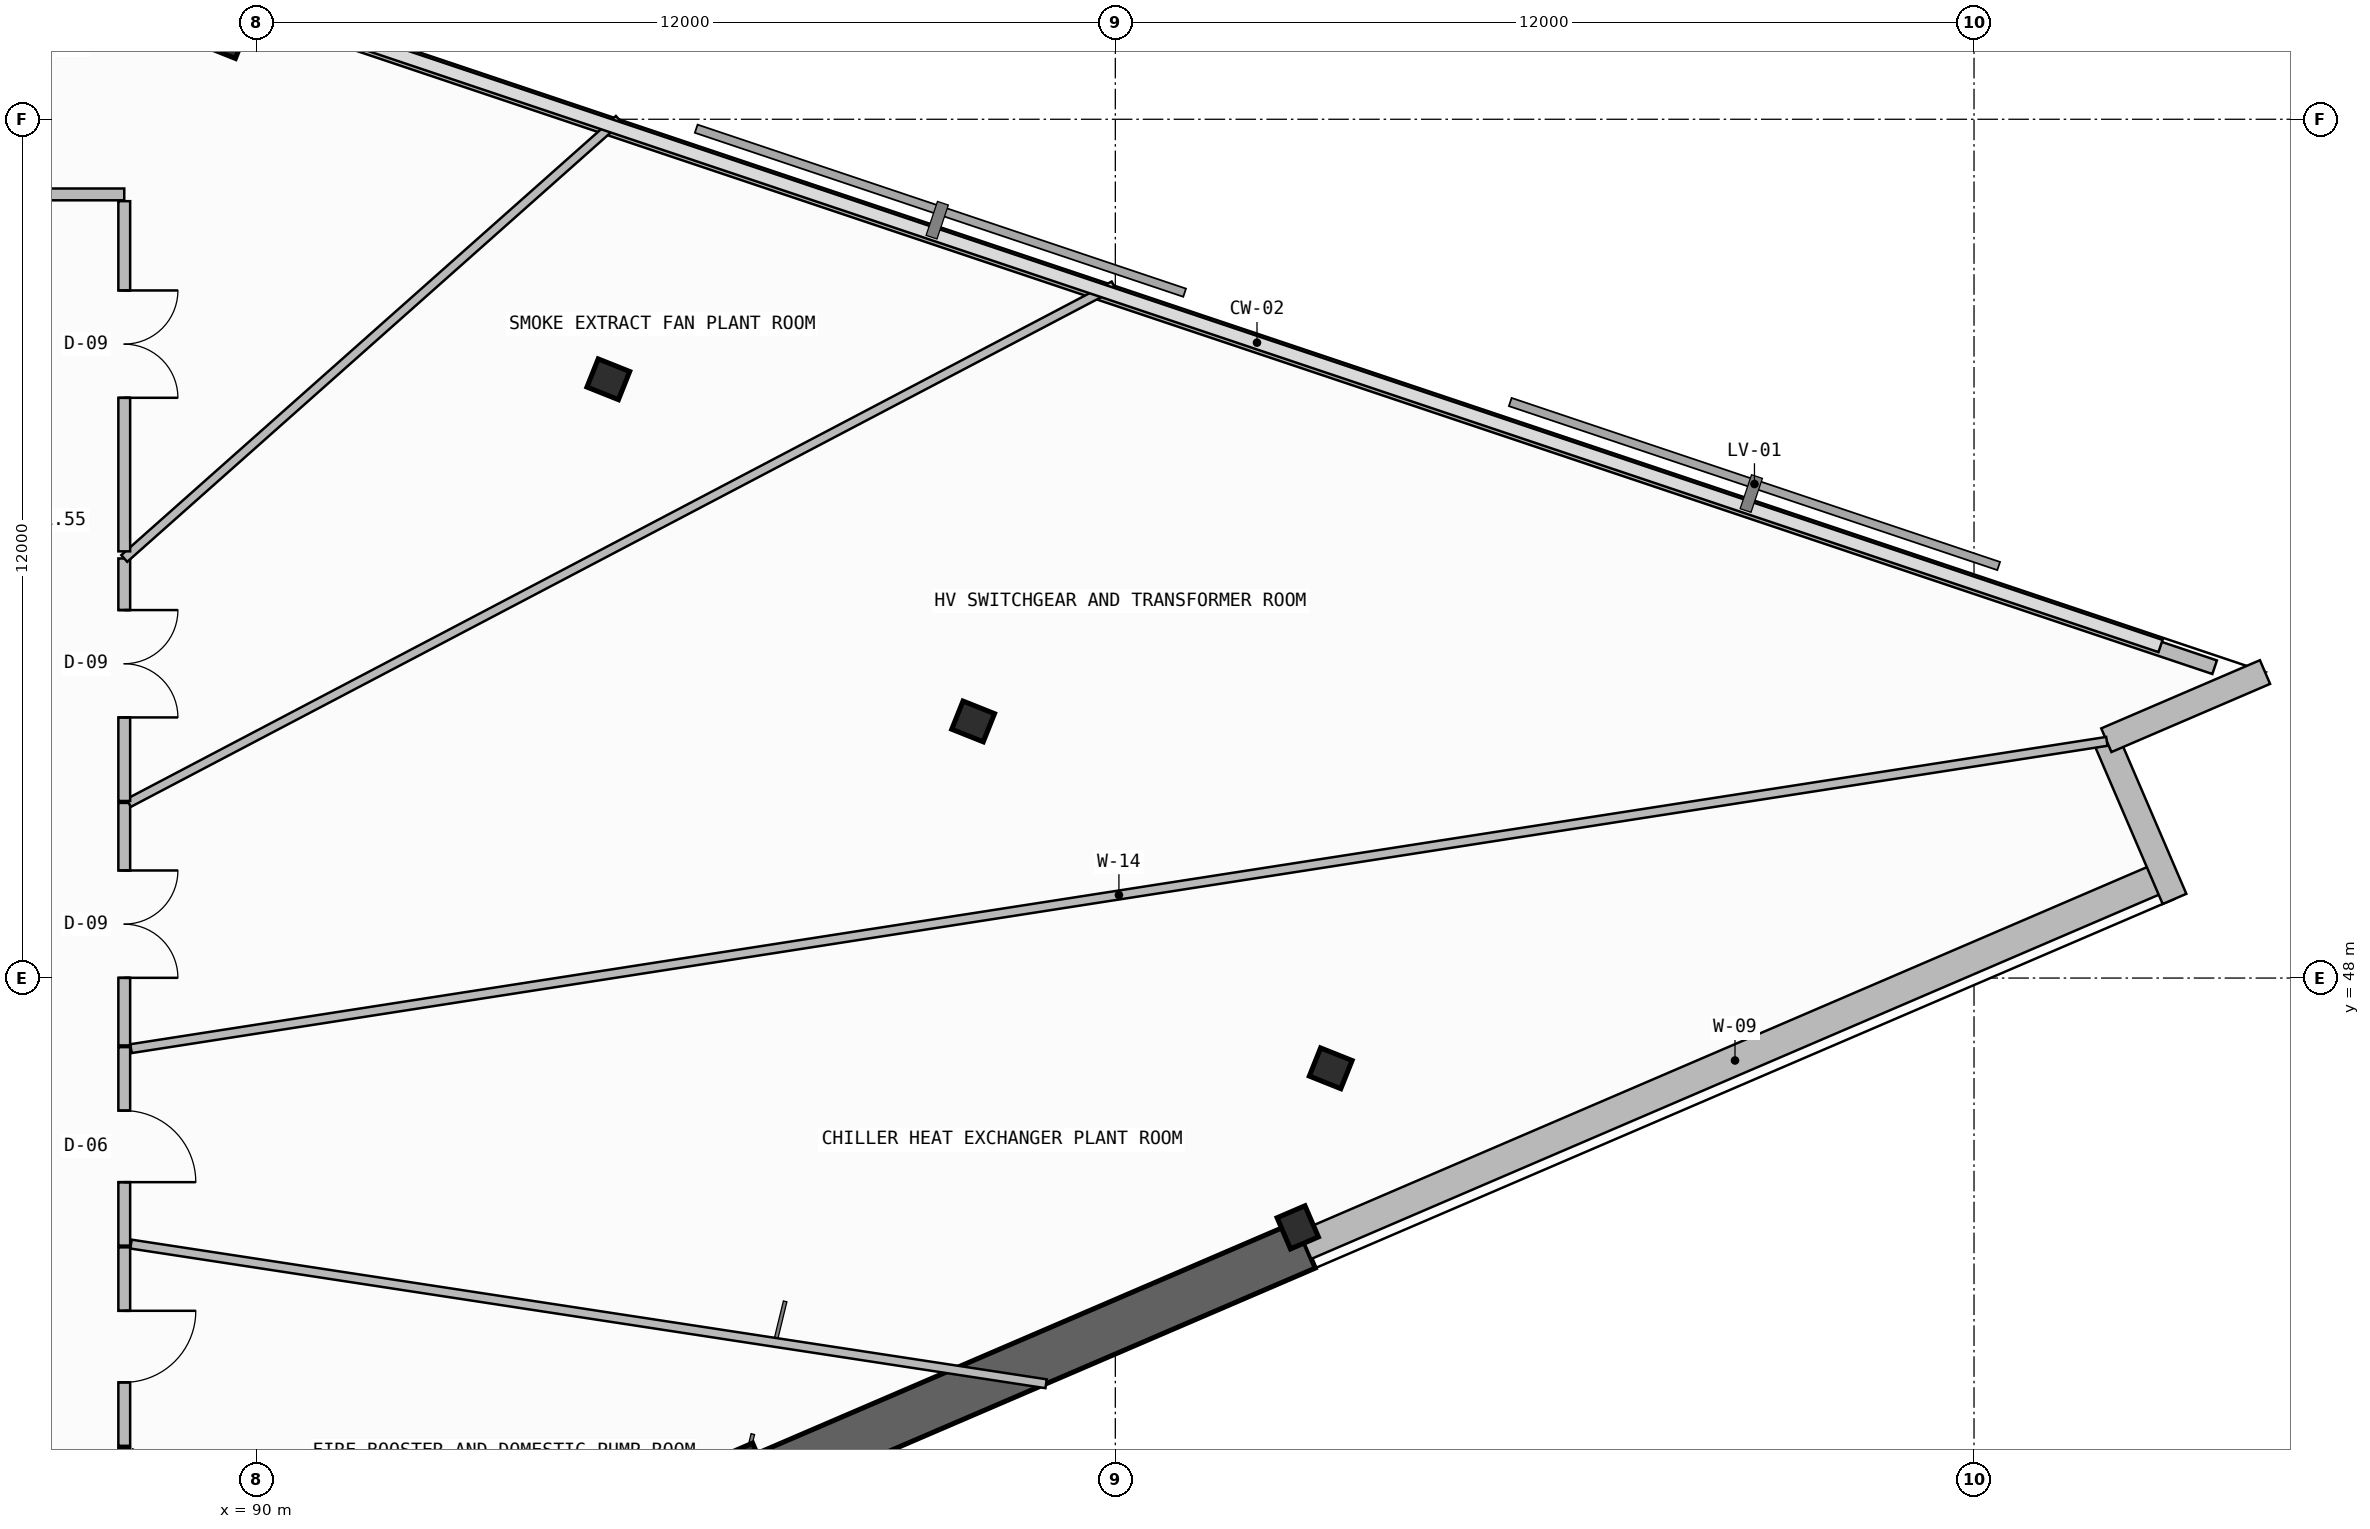
"""IFC4 building model, lengths in metres.
Left out: names, types, materials, properties, quantities, classifications, styles, units other than length and angle.
Written with IfcOpenShell. Run it as: python <this file> out.ifc"""

import sys

from ifc_helpers import new_model, si_unit, direction, frame, frame_2d, origin, origin_2d, place, context, subcontext, project, spatial, rectangle, i_section, extrude, element, fill, save


model = new_model("IFC4")
c1 = context("Model", 3, precision=1e-05, world=origin(), true_north=direction((0.0, 1.0)))
c2 = subcontext(c1, "Body", "Model", "MODEL_VIEW")
j1 = project(units=[si_unit("LENGTHUNIT", "METRE"), si_unit("PLANEANGLEUNIT", "RADIAN")], contexts=[c1])
p1 = place(None, origin())
s1 = spatial("IfcSite", under=j1, at=p1, CompositionType="ELEMENT")
p2 = place(p1, origin())
s2 = spatial("IfcBuilding", under=s1, at=p2, CompositionType="ELEMENT")
p3 = place(p2, frame((0.0, 0.0, 196.7)))
s3 = spatial("IfcBuildingStorey", under=s2, at=p3, CompositionType="ELEMENT", Elevation=196.7)
for number, where, z_axis, x_axis in (
    (1, (96.83, 41.2, 0.0), (0.0, 0.0, 1.0), (0.919, 0.395, 0.0)),
    (2, (104.549, 44.517, 0.0), (0.0, 0.0, 1.0), (0.919, 0.395, 0.0)),
    (3, (105.01, 46.739, 0.0), (0.0, 0.0, 1.0), (0.371, 0.929, 0.0)),
    (4, (100.013, 51.585, 0.0), (0.0, 0.0, 1.0), (0.371, 0.929, 0.0)),
    (5, (94.915, 56.367, 0.0), (0.0, 0.0, 1.0), (0.371, 0.929, 0.0)),
    (6, (89.562, 61.135, 0.0), (0.0, 0.0, 1.0), (0.371, 0.929, 0.0)),
):
    element("IfcColumn", number, at=place(p3, frame(where, z_axis=z_axis, x_axis=x_axis)), inside=s3, PredefinedType="COLUMN", context=c2, shape_type="SweptSolid", body=[
        extrude(i_section(OverallWidth=0.424, OverallDepth=0.474, WebThickness=0.048, FlangeThickness=0.077, FilletRadius=0.015, at=origin_2d()), origin(), (0.0, 0.0, 1.0), 4.2),
    ])
p4 = place(p3, frame((96.937, 40.952, -0.5), z_axis=(0.0, 0.0, 1.0), x_axis=(0.918782407933, 0.394764343468, 0.0)))
e7 = element("IfcWall", 7, at=p4, inside=s3, PredefinedType="SHEAR", context=c2, shape_type="SweptSolid", body=[
    extrude(rectangle(XDim=8.402, YDim=0.7, at=frame_2d((4.201, 0.0))), origin(), (0.0, 0.0, 1.0), 4.3),
])
p5 = place(p3, frame((104.656, 44.269, 0.0), z_axis=(0.0, 0.0, 1.0), x_axis=(0.918789071809, 0.394748833467, 0.0)))
e8 = element("IfcWall", 8, at=p5, inside=s3, PredefinedType="SOLIDWALL", context=c2, shape_type="SweptSolid", body=[
    extrude(rectangle(XDim=13.069, YDim=0.42, at=frame_2d((6.534, 0.0))), origin(), (0.0, 0.0, 1.0), 2.777),
])
p6 = place(p3, frame((116.802, 49.106, 0.0), z_axis=(0.0, 0.0, 1.0), x_axis=(-0.394712707157, 0.918804592288, 0.0)))
e9 = element("IfcWall", 9, at=p6, inside=s3, PredefinedType="SOLIDWALL", context=c2, shape_type="SweptSolid", body=[
    extrude(rectangle(XDim=2.414, YDim=0.36, at=frame_2d((1.207, 0.0))), origin(), (0.0, 0.0, 1.0), 3.8),
])
p7 = place(p3, frame((115.849, 51.323, 0.0), z_axis=(0.0, 0.0, 1.0), x_axis=(0.918788830096, 0.394749396062, 0.0)))
e10 = element("IfcWall", 10, at=p7, inside=s3, PredefinedType="SOLIDWALL", context=c2, shape_type="SweptSolid", body=[
    extrude(rectangle(XDim=2.413, YDim=0.36, at=frame_2d((1.207, 0.0))), origin(), (0.0, 0.0, 1.0), 3.8),
])
p8 = place(p3, frame((117.363, 52.344, 0.0), z_axis=(0.0, 0.0, 1.0), x_axis=(-0.94800468727, 0.31825636351, 0.0)))
e11 = element("IfcWall", 11, at=p8, inside=s3, PredefinedType="PARAPET", context=c2, shape_type="SweptSolid", body=[
    extrude(rectangle(XDim=31.869, YDim=0.2, at=frame_2d((15.935, 0.0))), origin(), (0.0, 0.0, 1.0), 1.15),
])
p9 = place(p3, frame((88.15, 38.592, 0.0), z_axis=(0.0, 0.0, 1.0), x_axis=(0.0, 1.0, 0.0)))
e12 = element("IfcWall", 12, at=p9, inside=s3, PredefinedType="PARTITIONING", context=c2, shape_type="SweptSolid", body=[
    extrude(rectangle(XDim=2.845, YDim=0.165, at=frame_2d((1.423, 0.0))), origin(), (0.0, 0.0, 1.0), 2.777),
])
p10 = place(p9, frame((0.706, 0.0, 0.0)))
e13 = element("IfcOpeningElement", 13, at=p10, cuts=e12, PredefinedType="OPENING", context=c2, shape_type="SweptSolid", body=[
    extrude(rectangle(XDim=1.0, YDim=2.2, at=frame_2d((0.5, 1.1))), frame((0.0, 0.093, 0.0), z_axis=(0.0, -1.0, 0.0), x_axis=(1.0, 0.0, 0.0)), (0.0, 0.0, 1.0), 0.185),
])
p11 = place(p3, frame((88.244, 41.355, 0.0), z_axis=(0.0, 0.0, 1.0), x_axis=(0.910133851889, -0.414314339175, 0.0)))
e14 = element("IfcWall", 14, at=p11, inside=s3, PredefinedType="PARTITIONING", context=c2, shape_type="SweptSolid", body=[
    extrude(rectangle(XDim=5.61, YDim=0.125, at=frame_2d((2.805, 0.0))), origin(), (0.0, 0.0, 1.0), 2.777),
])
p12 = place(p3, frame((88.15, 44.261, 0.0), z_axis=(0.0, 0.0, 1.0), x_axis=(0.0, 1.0, 0.0)))
e15 = element("IfcWall", 15, at=p12, inside=s3, PredefinedType="PARTITIONING", context=c2, shape_type="SweptSolid", body=[
    extrude(rectangle(XDim=2.773, YDim=0.165, at=frame_2d((1.387, 0.0))), origin(), (0.0, 0.0, 1.0), 3.8),
])
p13 = place(p12, frame((0.887, 0.0, 0.0)))
e16 = element("IfcOpeningElement", 16, at=p13, cuts=e15, PredefinedType="OPENING", context=c2, shape_type="SweptSolid", body=[
    extrude(rectangle(XDim=1.0, YDim=2.2, at=frame_2d((0.5, 1.1))), frame((0.0, 0.093, 0.0), z_axis=(0.0, -1.0, 0.0), x_axis=(1.0, 0.0, 0.0)), (0.0, 0.0, 1.0), 0.185),
])
p14 = place(p3, frame((101.033, 42.331, 0.0), z_axis=(0.0, 0.0, 1.0), x_axis=(-0.988557493013, 0.150844565722, 0.0)))
e17 = element("IfcWall", 17, at=p14, inside=s3, PredefinedType="PARTITIONING", context=c2, shape_type="SweptSolid", body=[
    extrude(rectangle(XDim=12.937, YDim=0.125, at=frame_2d((6.468, 0.0))), origin(), (0.0, 0.0, 1.0), 2.777),
])
p15 = place(p3, frame((88.244, 47.014, 0.0), z_axis=(0.0, 0.0, 1.0), x_axis=(0.988125579116, 0.153648429528, 0.0)))
e18 = element("IfcWall", 18, at=p15, inside=s3, PredefinedType="PARTITIONING", context=c2, shape_type="SweptSolid", body=[
    extrude(rectangle(XDim=27.943, YDim=0.125, at=frame_2d((13.972, 0.0))), origin(), (0.0, 0.0, 1.0), 2.777),
])
p16 = place(p3, frame((88.15, 41.464, 0.0), z_axis=(0.0, 0.0, 1.0), x_axis=(0.0, 1.0, 0.0)))
e19 = element("IfcWall", 19, at=p16, inside=s3, PredefinedType="PARTITIONING", context=c2, shape_type="SweptSolid", body=[
    extrude(rectangle(XDim=2.773, YDim=0.165, at=frame_2d((1.387, 0.0))), origin(), (0.0, 0.0, 1.0), 2.777),
])
p17 = place(p16, frame((0.887, 0.0, 0.0)))
e20 = element("IfcOpeningElement", 20, at=p17, cuts=e19, PredefinedType="OPENING", context=c2, shape_type="SweptSolid", body=[
    extrude(rectangle(XDim=1.0, YDim=2.2, at=frame_2d((0.5, 1.1))), frame((0.0, 0.093, 0.0), z_axis=(0.0, -1.0, 0.0), x_axis=(1.0, 0.0, 0.0)), (0.0, 0.0, 1.0), 0.185),
])
p18 = place(p3, frame((88.15, 47.059, 0.0), z_axis=(0.0, 0.0, 1.0), x_axis=(0.0, 1.0, 0.0)))
e21 = element("IfcWall", 21, at=p18, inside=s3, PredefinedType="PARTITIONING", context=c2, shape_type="SweptSolid", body=[
    extrude(rectangle(XDim=3.388, YDim=0.165, at=frame_2d((1.694, 0.0))), origin(), (0.0, 0.0, 1.0), 3.8),
])
p19 = place(p18, frame((0.944, 0.0, 0.0)))
e22 = element("IfcOpeningElement", 22, at=p19, cuts=e21, PredefinedType="OPENING", context=c2, shape_type="SweptSolid", body=[
    extrude(rectangle(XDim=1.5, YDim=2.25, at=frame_2d((0.75, 1.125))), frame((0.0, 0.093, 0.0), z_axis=(0.0, -1.0, 0.0), x_axis=(1.0, 0.0, 0.0)), (0.0, 0.0, 1.0), 0.185),
])
p20 = place(p3, frame((88.213, 50.447, 0.0), z_axis=(0.0, 0.0, 1.0), x_axis=(0.885317432513, 0.464987143574, 0.0)))
e23 = element("IfcWall", 23, at=p20, inside=s3, PredefinedType="PARTITIONING", context=c2, shape_type="SweptSolid", body=[
    extrude(rectangle(XDim=15.548, YDim=0.125, at=frame_2d((7.774, 0.0))), origin(), (0.0, 0.0, 1.0), 2.777),
])
p21 = place(p3, frame((88.15, 50.474, 0.0), z_axis=(0.0, 0.0, 1.0), x_axis=(0.0, 1.0, 0.0)))
e24 = element("IfcWall", 24, at=p21, inside=s3, PredefinedType="PARTITIONING", context=c2, shape_type="SweptSolid", body=[
    extrude(rectangle(XDim=3.388, YDim=0.165, at=frame_2d((1.694, 0.0))), origin(), (0.0, 0.0, 1.0), 3.8),
])
p22 = place(p21, frame((1.167, 0.0, 0.0)))
e25 = element("IfcOpeningElement", 25, at=p22, cuts=e24, PredefinedType="OPENING", context=c2, shape_type="SweptSolid", body=[
    extrude(rectangle(XDim=1.5, YDim=2.25, at=frame_2d((0.75, 1.125))), frame((0.0, 0.093, 0.0), z_axis=(0.0, -1.0, 0.0), x_axis=(1.0, 0.0, 0.0)), (0.0, 0.0, 1.0), 0.185),
])
p23 = place(p3, frame((88.15, 53.863, 0.0), z_axis=(0.0, 0.0, 1.0), x_axis=(0.747844904677, 0.66387348083, 0.0)))
e26 = element("IfcWall", 26, at=p23, inside=s3, PredefinedType="PARTITIONING", context=c2, shape_type="SweptSolid", body=[
    extrude(rectangle(XDim=9.243, YDim=0.125, at=frame_2d((4.621, 0.0))), origin(), (0.0, 0.0, 1.0), 2.777),
])
p24 = place(p3, frame((88.15, 58.95, 0.0), z_axis=(0.0, 0.0, 1.0), x_axis=(-1.0, 0.0, 0.0)))
e27 = element("IfcWall", 27, at=p24, inside=s3, PredefinedType="PARTITIONING", context=c2, shape_type="SweptSolid", body=[
    extrude(rectangle(XDim=5.572, YDim=0.165, at=frame_2d((2.786, 0.0))), origin(), (0.0, 0.0, 1.0), 2.777),
])
p25 = place(p3, frame((88.15, 53.962, 0.0), z_axis=(0.0, 0.0, 1.0), x_axis=(0.0, 1.0, 0.0)))
e28 = element("IfcWall", 28, at=p25, inside=s3, PredefinedType="PARTITIONING", context=c2, shape_type="SweptSolid", body=[
    extrude(rectangle(XDim=4.893, YDim=0.165, at=frame_2d((2.447, 0.0))), origin(), (0.0, 0.0, 1.0), 2.777),
])
p26 = place(p25, frame((2.146, 0.0, 0.0)))
e29 = element("IfcOpeningElement", 29, at=p26, cuts=e28, PredefinedType="OPENING", context=c2, shape_type="SweptSolid", body=[
    extrude(rectangle(XDim=1.5, YDim=2.25, at=frame_2d((0.75, 1.125))), frame((0.0, 0.093, 0.0), z_axis=(0.0, -1.0, 0.0), x_axis=(1.0, 0.0, 0.0)), (0.0, 0.0, 1.0), 0.185),
])
p27 = place(p13, frame((1.0, 0.0, 0.0), z_axis=(0.0, 0.0, 1.0), x_axis=(-1.0, 0.0, 0.0)))
e30 = element("IfcDoor", 30, at=p27, inside=s3, OperationType="SINGLE_SWING_RIGHT", PredefinedType="DOOR", context=c2, shape_type="SweptSolid", body=[
    extrude(rectangle(XDim=1.0, YDim=2.2, at=frame_2d((0.5, 1.1))), frame((0.0, 0.025, 0.0), z_axis=(0.0, -1.0, 0.0), x_axis=(1.0, 0.0, 0.0)), (0.0, 0.0, 1.0), 0.05),
])
fill(e16, e30)
p28 = place(p17, frame((1.0, 0.0, 0.0), z_axis=(0.0, 0.0, 1.0), x_axis=(-1.0, 0.0, 0.0)))
e31 = element("IfcDoor", 31, at=p28, inside=s3, OperationType="SINGLE_SWING_LEFT", PredefinedType="DOOR", context=c2, shape_type="SweptSolid", body=[
    extrude(rectangle(XDim=1.0, YDim=2.2, at=frame_2d((0.5, 1.1))), frame((0.0, 0.025, 0.0), z_axis=(0.0, -1.0, 0.0), x_axis=(1.0, 0.0, 0.0)), (0.0, 0.0, 1.0), 0.05),
])
fill(e20, e31)
p29 = place(p19, frame((1.5, 0.0, 0.0), z_axis=(0.0, 0.0, 1.0), x_axis=(-1.0, 0.0, 0.0)))
e32 = element("IfcDoor", 32, at=p29, inside=s3, OperationType="DOUBLE_DOOR_SINGLE_SWING", PredefinedType="DOOR", context=c2, shape_type="SweptSolid", body=[
    extrude(rectangle(XDim=1.5, YDim=2.25, at=frame_2d((0.75, 1.125))), frame((0.0, 0.025, 0.0), z_axis=(0.0, -1.0, 0.0), x_axis=(1.0, 0.0, 0.0)), (0.0, 0.0, 1.0), 0.05),
])
fill(e22, e32)
p30 = place(p22, frame((1.5, 0.0, 0.0), z_axis=(0.0, 0.0, 1.0), x_axis=(-1.0, 0.0, 0.0)))
e33 = element("IfcDoor", 33, at=p30, inside=s3, OperationType="DOUBLE_DOOR_SINGLE_SWING", PredefinedType="DOOR", context=c2, shape_type="SweptSolid", body=[
    extrude(rectangle(XDim=1.5, YDim=2.25, at=frame_2d((0.75, 1.125))), frame((0.0, 0.025, 0.0), z_axis=(0.0, -1.0, 0.0), x_axis=(1.0, 0.0, 0.0)), (0.0, 0.0, 1.0), 0.05),
])
fill(e25, e33)
p31 = place(p26, frame((1.5, 0.0, 0.0), z_axis=(0.0, 0.0, 1.0), x_axis=(-1.0, 0.0, 0.0)))
e34 = element("IfcDoor", 34, at=p31, inside=s3, OperationType="DOUBLE_DOOR_SINGLE_SWING", PredefinedType="DOOR", context=c2, shape_type="SweptSolid", body=[
    extrude(rectangle(XDim=1.5, YDim=2.25, at=frame_2d((0.75, 1.125))), frame((0.0, 0.025, 0.0), z_axis=(0.0, -1.0, 0.0), x_axis=(1.0, 0.0, 0.0)), (0.0, 0.0, 1.0), 0.05),
])
fill(e29, e34)
save(model, sys.argv[1])
